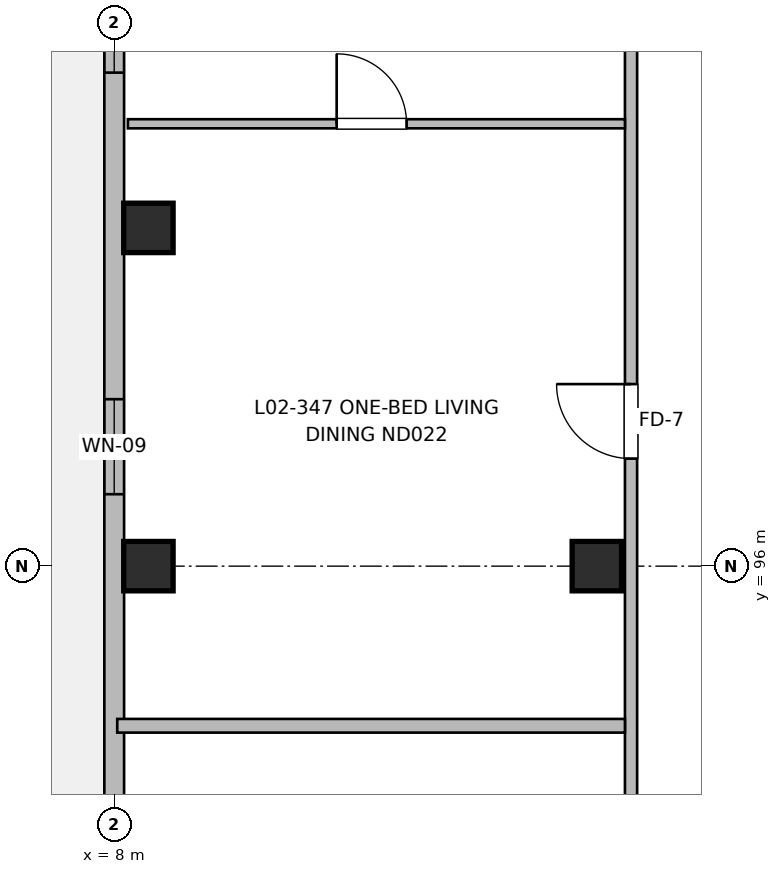
"""IFC4 building model, lengths in metres.
Left out: names, types, materials, properties, quantities, classifications, styles, units other than length and angle.
Written with IfcOpenShell. Run it as: python <this file> out.ifc"""

import sys

from ifc_helpers import new_model, si_unit, direction, frame, frame_2d, origin, origin_2d, place, context, subcontext, project, spatial, rectangle, extrude, element, fill, save


model = new_model("IFC4")
c1 = context("Model", 3, precision=1e-05, world=origin(), true_north=direction((0.0, 1.0)))
c2 = subcontext(c1, "Body", "Model", "MODEL_VIEW")
j1 = project(units=[si_unit("LENGTHUNIT", "METRE"), si_unit("PLANEANGLEUNIT", "RADIAN")], contexts=[c1])
p1 = place(None, origin())
s1 = spatial("IfcSite", under=j1, at=p1, CompositionType="ELEMENT")
p2 = place(p1, origin())
s2 = spatial("IfcBuilding", under=s1, at=p2, CompositionType="ELEMENT")
p3 = place(p2, frame((0.0, 0.0, 7.36)))
s3 = spatial("IfcBuildingStorey", under=s2, at=p3, CompositionType="ELEMENT", Elevation=7.36)
for number, where, z_axis, x_axis in (
    (1, (8.45, 96.0, 0.0), (0.0, 0.0, 1.0), (1.0, 0.0, 0.0)),
    (2, (8.45, 100.45, 0.0), (0.0, 0.0, 1.0), (1.0, 0.0, 0.0)),
    (3, (14.35, 96.0, 0.0), (0.0, 0.0, 1.0), (1.0, 0.0, 0.0)),
):
    element("IfcColumn", number, at=place(p3, frame(where, z_axis=z_axis, x_axis=x_axis)), inside=s3, PredefinedType="COLUMN", context=c2, shape_type="SweptSolid", body=[
        extrude(rectangle(XDim=0.65, YDim=0.65, at=origin_2d()), origin(), (0.0, 0.0, 1.0), 3.2),
    ])
p4 = place(p3, frame((8.0, 56.0, 0.0), z_axis=(0.0, 0.0, 1.0), x_axis=(0.0, 1.0, 0.0)))
e4 = element("IfcWall", 4, at=p4, inside=s3, PredefinedType="SOLIDWALL", context=c2, shape_type="SweptSolid", body=[
    extrude(rectangle(XDim=60.0, YDim=0.26, at=frame_2d((30.0, 0.0))), origin(), (0.0, 0.0, 1.0), 2.98),
])
p5 = place(p4, frame((4.886, 0.0, 0.0)))
e5 = element("IfcOpeningElement", 5, at=p5, cuts=e4, PredefinedType="OPENING", context=c2, shape_type="SweptSolid", body=[
    extrude(rectangle(XDim=1.2, YDim=2.2, at=frame_2d((0.6, 1.1))), frame((0.0, 0.14, 0.0), z_axis=(0.0, -1.0, 0.0), x_axis=(1.0, 0.0, 0.0)), (0.0, 0.0, 1.0), 0.28),
])
p6 = place(p4, frame((12.107, 0.0, 0.82)))
e6 = element("IfcOpeningElement", 6, at=p6, cuts=e4, PredefinedType="OPENING", context=c2, shape_type="SweptSolid", body=[
    extrude(rectangle(XDim=1.5, YDim=1.4, at=frame_2d((0.75, 0.7))), frame((0.0, 0.14, 0.0), z_axis=(0.0, -1.0, 0.0), x_axis=(1.0, 0.0, 0.0)), (0.0, 0.0, 1.0), 0.28),
])
p7 = place(p4, frame((19.804, 0.0, 0.82)))
e7 = element("IfcOpeningElement", 7, at=p7, cuts=e4, PredefinedType="OPENING", context=c2, shape_type="SweptSolid", body=[
    extrude(rectangle(XDim=1.55, YDim=1.4, at=frame_2d((0.775, 0.7))), frame((0.0, 0.14, 0.0), z_axis=(0.0, -1.0, 0.0), x_axis=(1.0, 0.0, 0.0)), (0.0, 0.0, 1.0), 0.28),
])
p8 = place(p4, frame((29.3, 0.0, 0.87)))
e8 = element("IfcOpeningElement", 8, at=p8, cuts=e4, PredefinedType="OPENING", context=c2, shape_type="SweptSolid", body=[
    extrude(rectangle(XDim=1.4, YDim=1.35, at=frame_2d((0.7, 0.675))), frame((0.0, 0.14, 0.0), z_axis=(0.0, -1.0, 0.0), x_axis=(1.0, 0.0, 0.0)), (0.0, 0.0, 1.0), 0.28),
])
p9 = place(p4, frame((40.946, 0.0, 0.87)))
e9 = element("IfcOpeningElement", 9, at=p9, cuts=e4, PredefinedType="OPENING", context=c2, shape_type="SweptSolid", body=[
    extrude(rectangle(XDim=1.25, YDim=1.35, at=frame_2d((0.625, 0.675))), frame((0.0, 0.14, 0.0), z_axis=(0.0, -1.0, 0.0), x_axis=(1.0, 0.0, 0.0)), (0.0, 0.0, 1.0), 0.28),
])
p10 = place(p4, frame((46.493, 0.0, 0.82)))
e10 = element("IfcOpeningElement", 10, at=p10, cuts=e4, PredefinedType="OPENING", context=c2, shape_type="SweptSolid", body=[
    extrude(rectangle(XDim=1.3, YDim=1.4, at=frame_2d((0.65, 0.7))), frame((0.0, 0.14, 0.0), z_axis=(0.0, -1.0, 0.0), x_axis=(1.0, 0.0, 0.0)), (0.0, 0.0, 1.0), 0.28),
])
p11 = place(p4, frame((55.514, 0.0, 0.67)))
e11 = element("IfcOpeningElement", 11, at=p11, cuts=e4, PredefinedType="OPENING", context=c2, shape_type="SweptSolid", body=[
    extrude(rectangle(XDim=2.1, YDim=1.55, at=frame_2d((1.05, 0.775))), frame((0.0, 0.14, 0.0), z_axis=(0.0, -1.0, 0.0), x_axis=(1.0, 0.0, 0.0)), (0.0, 0.0, 1.0), 0.28),
])
p12 = place(p3, frame((14.8, 56.18, 0.0), z_axis=(0.0, 0.0, 1.0), x_axis=(0.0, 1.0, 0.0)))
e12 = element("IfcWall", 12, at=p12, inside=s3, PredefinedType="PARTITIONING", context=c2, shape_type="SweptSolid", body=[
    extrude(rectangle(XDim=50.62, YDim=0.16, at=frame_2d((25.31, 0.0))), origin(), (0.0, 0.0, 1.0), 2.935),
])
p13 = place(p12, frame((12.82, 0.0, 0.0)))
e13 = element("IfcOpeningElement", 13, at=p13, cuts=e12, PredefinedType="OPENING", context=c2, shape_type="SweptSolid", body=[
    extrude(rectangle(XDim=1.1, YDim=2.15, at=frame_2d((0.55, 1.075))), frame((0.0, 0.09, 0.0), z_axis=(0.0, -1.0, 0.0), x_axis=(1.0, 0.0, 0.0)), (0.0, 0.0, 1.0), 0.18),
])
p14 = place(p12, frame((19.22, 0.0, 0.0)))
e14 = element("IfcOpeningElement", 14, at=p14, cuts=e12, PredefinedType="OPENING", context=c2, shape_type="SweptSolid", body=[
    extrude(rectangle(XDim=1.6, YDim=2.15, at=frame_2d((0.8, 1.075))), frame((0.0, 0.09, 0.0), z_axis=(0.0, -1.0, 0.0), x_axis=(1.0, 0.0, 0.0)), (0.0, 0.0, 1.0), 0.18),
])
p15 = place(p12, frame((1.8, 0.0, 0.0)))
e15 = element("IfcOpeningElement", 15, at=p15, cuts=e12, PredefinedType="OPENING", context=c2, shape_type="SweptSolid", body=[
    extrude(rectangle(XDim=0.96, YDim=2.15, at=frame_2d((0.48, 1.075))), frame((0.0, 0.09, 0.0), z_axis=(0.0, -1.0, 0.0), x_axis=(1.0, 0.0, 0.0)), (0.0, 0.0, 1.0), 0.18),
])
p16 = place(p12, frame((32.625, 0.0, 0.0)))
e16 = element("IfcOpeningElement", 16, at=p16, cuts=e12, PredefinedType="OPENING", context=c2, shape_type="SweptSolid", body=[
    extrude(rectangle(XDim=0.98, YDim=2.15, at=frame_2d((0.49, 1.075))), frame((0.0, 0.09, 0.0), z_axis=(0.0, -1.0, 0.0), x_axis=(1.0, 0.0, 0.0)), (0.0, 0.0, 1.0), 0.18),
])
p17 = place(p12, frame((41.235, 0.0, 0.0)))
e17 = element("IfcOpeningElement", 17, at=p17, cuts=e12, PredefinedType="OPENING", context=c2, shape_type="SweptSolid", body=[
    extrude(rectangle(XDim=0.98, YDim=2.15, at=frame_2d((0.49, 1.075))), frame((0.0, 0.09, 0.0), z_axis=(0.0, -1.0, 0.0), x_axis=(1.0, 0.0, 0.0)), (0.0, 0.0, 1.0), 0.18),
])
p18 = place(p3, frame((8.04, 93.9, 0.0), z_axis=(0.0, 0.0, 1.0), x_axis=(1.0, 0.0, 0.0)))
e18 = element("IfcWall", 18, at=p18, inside=s3, PredefinedType="PARTITIONING", context=c2, shape_type="SweptSolid", body=[
    extrude(rectangle(XDim=6.68, YDim=0.18, at=frame_2d((3.34, 0.0))), origin(), (0.0, 0.0, 1.0), 2.935),
])
p19 = place(p3, frame((8.18, 101.82, 0.0), z_axis=(0.0, 0.0, 1.0), x_axis=(1.0, 0.0, 0.0)))
e19 = element("IfcWall", 19, at=p19, inside=s3, PredefinedType="PARTITIONING", context=c2, shape_type="SweptSolid", body=[
    extrude(rectangle(XDim=6.54, YDim=0.12, at=frame_2d((3.27, 0.0))), origin(), (0.0, 0.0, 1.0), 2.935),
])
p20 = place(p19, frame((2.747, 0.0, 0.0)))
e20 = element("IfcOpeningElement", 20, at=p20, cuts=e19, PredefinedType="OPENING", context=c2, shape_type="SweptSolid", body=[
    extrude(rectangle(XDim=0.92, YDim=2.1, at=frame_2d((0.46, 1.05))), frame((0.0, 0.07, 0.0), z_axis=(0.0, -1.0, 0.0), x_axis=(1.0, 0.0, 0.0)), (0.0, 0.0, 1.0), 0.14),
])
p21 = place(p9, origin())
e21 = element("IfcWindow", 21, at=p21, inside=s3, PartitioningType="SINGLE_PANEL", PredefinedType="WINDOW", context=c2, shape_type="SweptSolid", body=[
    extrude(rectangle(XDim=1.25, YDim=1.35, at=frame_2d((0.625, 0.675))), frame((0.0, 0.03, 0.0), z_axis=(0.0, -1.0, 0.0), x_axis=(1.0, 0.0, 0.0)), (0.0, 0.0, 1.0), 0.06),
])
fill(e9, e21)
p22 = place(p10, origin())
e22 = element("IfcWindow", 22, at=p22, inside=s3, PartitioningType="SINGLE_PANEL", PredefinedType="WINDOW", context=c2, shape_type="SweptSolid", body=[
    extrude(rectangle(XDim=1.3, YDim=1.4, at=frame_2d((0.65, 0.7))), frame((0.0, 0.03, 0.0), z_axis=(0.0, -1.0, 0.0), x_axis=(1.0, 0.0, 0.0)), (0.0, 0.0, 1.0), 0.06),
])
fill(e10, e22)
p23 = place(p20, origin())
e23 = element("IfcDoor", 23, at=p23, inside=s3, OperationType="SINGLE_SWING_LEFT", PredefinedType="DOOR", context=c2, shape_type="SweptSolid", body=[
    extrude(rectangle(XDim=0.92, YDim=2.1, at=frame_2d((0.46, 1.05))), frame((0.0, 0.025, 0.0), z_axis=(0.0, -1.0, 0.0), x_axis=(1.0, 0.0, 0.0)), (0.0, 0.0, 1.0), 0.05),
])
fill(e20, e23)
p24 = place(p17, origin())
e24 = element("IfcDoor", 24, at=p24, inside=s3, OperationType="SINGLE_SWING_RIGHT", PredefinedType="DOOR", context=c2, shape_type="SweptSolid", body=[
    extrude(rectangle(XDim=0.98, YDim=2.15, at=frame_2d((0.49, 1.075))), frame((0.0, 0.025, 0.0), z_axis=(0.0, -1.0, 0.0), x_axis=(1.0, 0.0, 0.0)), (0.0, 0.0, 1.0), 0.05),
])
fill(e17, e24)
save(model, sys.argv[1])
